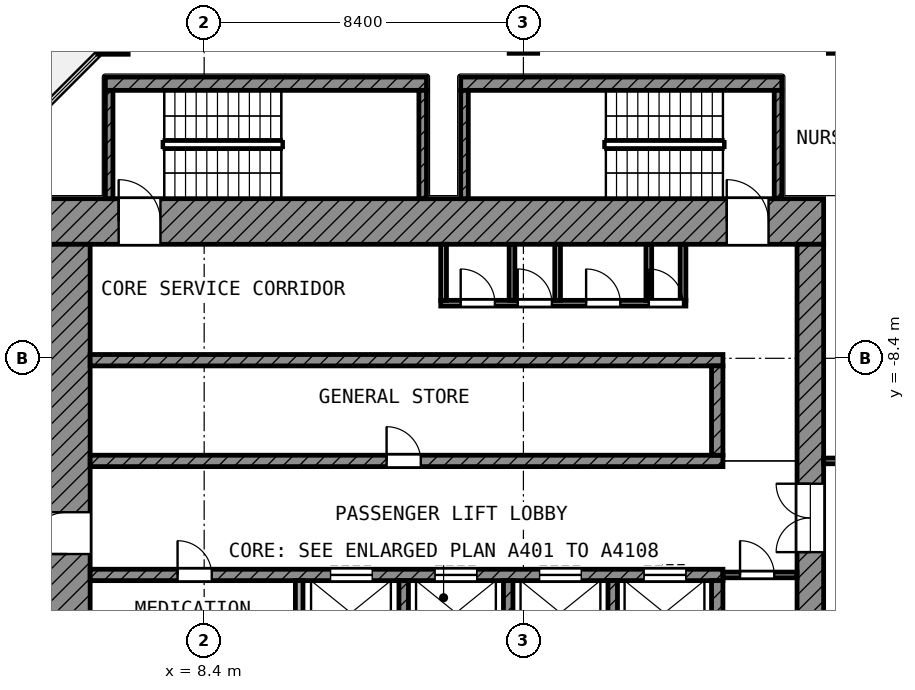
"""IFC4 building model, lengths in metres.
Left out: names, types, materials, properties, quantities, classifications, styles, units other than length and angle.
Written with IfcOpenShell. Run it as: python <this file> out.ifc"""

import sys

from ifc_helpers import new_model, si_unit, direction, frame, frame_2d, origin, origin_2d, place, context, subcontext, project, spatial, rectangle, extrude, element, fill, save


model = new_model("IFC4")
c1 = context("Model", 3, precision=1e-05, world=origin(), true_north=direction((0.0, 1.0)))
c2 = subcontext(c1, "Body", "Model", "MODEL_VIEW")
j1 = project(units=[si_unit("LENGTHUNIT", "METRE"), si_unit("PLANEANGLEUNIT", "RADIAN")], contexts=[c1])
p1 = place(None, origin())
s1 = spatial("IfcSite", under=j1, at=p1, CompositionType="ELEMENT")
p2 = place(p1, origin())
s2 = spatial("IfcBuilding", under=s1, at=p2, CompositionType="ELEMENT")
p3 = place(p2, frame((0.0, 0.0, 298.6)))
s3 = spatial("IfcBuildingStorey", under=s2, at=p3, CompositionType="ELEMENT", Elevation=298.6)
p4 = place(p3, frame((6.0, 0.0, 0.0), z_axis=(0.0, 0.0, 1.0), x_axis=(1.0, 0.0, 0.0)))
e1 = element("IfcColumn", 1, at=p4, inside=s3, PredefinedType="COLUMN", context=c2, shape_type="SweptSolid", body=[
    extrude(rectangle(XDim=0.8, YDim=0.8, at=origin_2d()), origin(), (0.0, 0.0, 1.0), 4.2),
])
for number, where, z_axis, x_axis in (
    (2, (16.8, 0.0, 0.0), (0.0, 0.0, 1.0), (1.0, 0.0, 0.0)),
    (3, (25.2, 0.0, 0.0), (0.0, 0.0, 1.0), (1.0, 0.0, 0.0)),
):
    element("IfcColumn", number, at=place(p3, frame(where, z_axis=z_axis, x_axis=x_axis)), inside=s3, PredefinedType="COLUMN", context=c2, shape_type="SweptSolid", body=[
        extrude(rectangle(XDim=0.75, YDim=0.75, at=origin_2d()), origin(), (0.0, 0.0, 1.0), 4.2),
    ])
p5 = place(p3, frame((4.2, -4.8, 0.0), z_axis=(0.0, 0.0, 1.0), x_axis=(1.0, 0.0, 0.0)))
e4 = element("IfcWall", 4, at=p5, inside=s3, PredefinedType="SHEAR", context=c2, shape_type="SweptSolid", body=[
    extrude(rectangle(XDim=20.5, YDim=1.2, at=frame_2d((10.25, 0.0))), origin(), (0.0, 0.0, 1.0), 3.6),
])
p6 = place(p5, frame((1.95, 0.0, 0.0)))
e5 = element("IfcOpeningElement", 5, at=p6, cuts=e4, PredefinedType="OPENING", context=c2, shape_type="SweptSolid", body=[
    extrude(rectangle(XDim=1.1, YDim=2.1, at=frame_2d((0.55, 1.05))), frame((0.0, 0.61, 0.0), z_axis=(0.0, -1.0, 0.0), x_axis=(1.0, 0.0, 0.0)), (0.0, 0.0, 1.0), 1.22),
])
p7 = place(p5, frame((17.95, 0.0, 0.0)))
e6 = element("IfcOpeningElement", 6, at=p7, cuts=e4, PredefinedType="OPENING", context=c2, shape_type="SweptSolid", body=[
    extrude(rectangle(XDim=1.1, YDim=2.1, at=frame_2d((0.55, 1.05))), frame((0.0, 0.61, 0.0), z_axis=(0.0, -1.0, 0.0), x_axis=(1.0, 0.0, 0.0)), (0.0, 0.0, 1.0), 1.22),
])
p8 = place(p3, frame((4.8, -24.7, 0.0), z_axis=(0.0, 0.0, 1.0), x_axis=(0.0, 1.0, 0.0)))
e7 = element("IfcWall", 7, at=p8, inside=s3, PredefinedType="SHEAR", context=c2, shape_type="SweptSolid", body=[
    extrude(rectangle(XDim=19.3, YDim=1.2, at=frame_2d((9.65, 0.0))), origin(), (0.0, 0.0, 1.0), 3.6),
])
p9 = place(p8, frame((11.15, 0.0, 0.0)))
e8 = element("IfcOpeningElement", 8, at=p9, cuts=e7, PredefinedType="OPENING", context=c2, shape_type="SweptSolid", body=[
    extrude(rectangle(XDim=1.1, YDim=2.1, at=frame_2d((0.55, 1.05))), frame((0.0, 0.61, 0.0), z_axis=(0.0, -1.0, 0.0), x_axis=(1.0, 0.0, 0.0)), (0.0, 0.0, 1.0), 1.22),
])
p10 = place(p8, frame((1.85, 0.0, 0.0)))
e9 = element("IfcOpeningElement", 9, at=p10, cuts=e7, PredefinedType="OPENING", context=c2, shape_type="SweptSolid", body=[
    extrude(rectangle(XDim=1.1, YDim=2.1, at=frame_2d((0.55, 1.05))), frame((0.0, 0.61, 0.0), z_axis=(0.0, -1.0, 0.0), x_axis=(1.0, 0.0, 0.0)), (0.0, 0.0, 1.0), 1.22),
])
p11 = place(p3, frame((24.35, -24.0, 0.0), z_axis=(0.0, 0.0, 1.0), x_axis=(0.0, 1.0, 0.0)))
e10 = element("IfcWall", 10, at=p11, inside=s3, PredefinedType="SHEAR", context=c2, shape_type="SweptSolid", body=[
    extrude(rectangle(XDim=18.6, YDim=0.7, at=frame_2d((9.3, 0.0))), origin(), (0.0, 0.0, 1.0), 3.6),
])
p12 = place(p11, frame((10.5, 0.0, 0.0)))
e11 = element("IfcOpeningElement", 11, at=p12, cuts=e10, PredefinedType="OPENING", context=c2, shape_type="SweptSolid", body=[
    extrude(rectangle(XDim=1.8, YDim=2.1, at=frame_2d((0.9, 1.05))), frame((0.0, 0.36, 0.0), z_axis=(0.0, -1.0, 0.0), x_axis=(1.0, 0.0, 0.0)), (0.0, 0.0, 1.0), 0.72),
])
p13 = place(p3, frame((5.4, -8.45, 0.0), z_axis=(0.0, 0.0, 1.0), x_axis=(1.0, 0.0, 0.0)))
e12 = element("IfcWall", 12, at=p13, inside=s3, PredefinedType="SHEAR", context=c2, shape_type="SweptSolid", body=[
    extrude(rectangle(XDim=16.65, YDim=0.3, at=frame_2d((8.325, 0.0))), origin(), (0.0, 0.0, 1.0), 3.6),
])
p14 = place(p3, frame((5.4, -11.1, 0.0), z_axis=(0.0, 0.0, 1.0), x_axis=(1.0, 0.0, 0.0)))
e13 = element("IfcWall", 13, at=p14, inside=s3, PredefinedType="SHEAR", context=c2, shape_type="SweptSolid", body=[
    extrude(rectangle(XDim=16.65, YDim=0.3, at=frame_2d((8.325, 0.0))), origin(), (0.0, 0.0, 1.0), 3.6),
])
p15 = place(p14, frame((7.8, 0.0, 0.0)))
e14 = element("IfcOpeningElement", 14, at=p15, cuts=e13, PredefinedType="OPENING", context=c2, shape_type="SweptSolid", body=[
    extrude(rectangle(XDim=0.9, YDim=2.1, at=frame_2d((0.45, 1.05))), frame((0.0, 0.16, 0.0), z_axis=(0.0, -1.0, 0.0), x_axis=(1.0, 0.0, 0.0)), (0.0, 0.0, 1.0), 0.32),
])
p16 = place(p3, frame((5.4, -14.1, 0.0), z_axis=(0.0, 0.0, 1.0), x_axis=(1.0, 0.0, 0.0)))
e15 = element("IfcWall", 15, at=p16, inside=s3, PredefinedType="SHEAR", context=c2, shape_type="SweptSolid", body=[
    extrude(rectangle(XDim=16.65, YDim=0.3, at=frame_2d((8.325, 0.0))), origin(), (0.0, 0.0, 1.0), 3.6),
])
p17 = place(p16, frame((6.325, 0.0, 0.0)))
e16 = element("IfcOpeningElement", 16, at=p17, cuts=e15, PredefinedType="OPENING", context=c2, shape_type="SweptSolid", body=[
    extrude(rectangle(XDim=1.1, YDim=2.1, at=frame_2d((0.55, 1.05))), frame((0.0, 0.16, 0.0), z_axis=(0.0, -1.0, 0.0), x_axis=(1.0, 0.0, 0.0)), (0.0, 0.0, 1.0), 0.32),
])
p18 = place(p16, frame((9.075, 0.0, 0.0)))
e17 = element("IfcOpeningElement", 17, at=p18, cuts=e15, PredefinedType="OPENING", context=c2, shape_type="SweptSolid", body=[
    extrude(rectangle(XDim=1.1, YDim=2.1, at=frame_2d((0.55, 1.05))), frame((0.0, 0.16, 0.0), z_axis=(0.0, -1.0, 0.0), x_axis=(1.0, 0.0, 0.0)), (0.0, 0.0, 1.0), 0.32),
])
p19 = place(p16, frame((11.825, 0.0, 0.0)))
e18 = element("IfcOpeningElement", 18, at=p19, cuts=e15, PredefinedType="OPENING", context=c2, shape_type="SweptSolid", body=[
    extrude(rectangle(XDim=1.1, YDim=2.1, at=frame_2d((0.55, 1.05))), frame((0.0, 0.16, 0.0), z_axis=(0.0, -1.0, 0.0), x_axis=(1.0, 0.0, 0.0)), (0.0, 0.0, 1.0), 0.32),
])
p20 = place(p16, frame((14.575, 0.0, 0.0)))
e19 = element("IfcOpeningElement", 19, at=p20, cuts=e15, PredefinedType="OPENING", context=c2, shape_type="SweptSolid", body=[
    extrude(rectangle(XDim=1.1, YDim=2.1, at=frame_2d((0.55, 1.05))), frame((0.0, 0.16, 0.0), z_axis=(0.0, -1.0, 0.0), x_axis=(1.0, 0.0, 0.0)), (0.0, 0.0, 1.0), 0.32),
])
p21 = place(p16, frame((2.3, 0.0, 0.0)))
e20 = element("IfcOpeningElement", 20, at=p21, cuts=e15, PredefinedType="OPENING", context=c2, shape_type="SweptSolid", body=[
    extrude(rectangle(XDim=0.9, YDim=2.1, at=frame_2d((0.45, 1.05))), frame((0.0, 0.16, 0.0), z_axis=(0.0, -1.0, 0.0), x_axis=(1.0, 0.0, 0.0)), (0.0, 0.0, 1.0), 0.32),
])
p22 = place(p3, frame((21.9, -10.95, 0.0), z_axis=(0.0, 0.0, 1.0), x_axis=(0.0, 1.0, 0.0)))
e21 = element("IfcWall", 21, at=p22, inside=s3, PredefinedType="SHEAR", context=c2, shape_type="SweptSolid", body=[
    extrude(rectangle(XDim=2.35, YDim=0.3, at=frame_2d((1.175, 0.0))), origin(), (0.0, 0.0, 1.0), 3.6),
])
p23 = place(p3, frame((21.9, -16.6, 0.0), z_axis=(0.0, 0.0, 1.0), x_axis=(0.0, 1.0, 0.0)))
e22 = element("IfcWall", 22, at=p23, inside=s3, PredefinedType="SHEAR", context=c2, shape_type="SweptSolid", body=[
    extrude(rectangle(XDim=2.35, YDim=0.3, at=frame_2d((1.175, 0.0))), origin(), (0.0, 0.0, 1.0), 3.6),
])
p24 = place(p3, frame((10.9, -16.6, 0.0), z_axis=(0.0, 0.0, 1.0), x_axis=(0.0, 1.0, 0.0)))
e23 = element("IfcWall", 23, at=p24, inside=s3, PredefinedType="PARTITIONING", context=c2, shape_type="SweptSolid", body=[
    extrude(rectangle(XDim=2.35, YDim=0.2, at=frame_2d((1.175, 0.0))), origin(), (0.0, 0.0, 1.0), 3.6),
])
for number, where, z_axis, x_axis in (
    (24, (13.65, -16.6, 0.0), (0.0, 0.0, 1.0), (0.0, 1.0, 0.0)),
    (25, (16.4, -16.6, 0.0), (0.0, 0.0, 1.0), (0.0, 1.0, 0.0)),
    (26, (19.15, -16.6, 0.0), (0.0, 0.0, 1.0), (0.0, 1.0, 0.0)),
):
    element("IfcWall", number, at=place(p3, frame(where, z_axis=z_axis, x_axis=x_axis)), inside=s3, PredefinedType="SHEAR", context=c2, shape_type="SweptSolid", body=[
        extrude(rectangle(XDim=2.35, YDim=0.25, at=frame_2d((1.175, 0.0))), origin(), (0.0, 0.0, 1.0), 3.6),
    ])
p25 = place(p3, frame((22.05, -14.1, 0.0), z_axis=(0.0, 0.0, 1.0), x_axis=(1.0, 0.0, 0.0)))
e27 = element("IfcWall", 27, at=p25, inside=s3, PredefinedType="PARTITIONING", context=c2, shape_type="SweptSolid", body=[
    extrude(rectangle(XDim=1.95, YDim=0.15, at=frame_2d((0.975, 0.0))), origin(), (0.0, 0.0, 1.0), 3.6),
])
p26 = place(p25, frame((0.45, 0.0, 0.0)))
e28 = element("IfcOpeningElement", 28, at=p26, cuts=e27, PredefinedType="OPENING", context=c2, shape_type="SweptSolid", body=[
    extrude(rectangle(XDim=0.9, YDim=2.1, at=frame_2d((0.45, 1.05))), frame((0.0, 0.085, 0.0), z_axis=(0.0, -1.0, 0.0), x_axis=(1.0, 0.0, 0.0)), (0.0, 0.0, 1.0), 0.17),
])
p27 = place(p3, frame((14.625, -6.95, 0.0), z_axis=(0.0, 0.0, 1.0), x_axis=(1.0, 0.0, 0.0)))
e29 = element("IfcWall", 29, at=p27, inside=s3, PredefinedType="PARTITIONING", context=c2, shape_type="SweptSolid", body=[
    extrude(rectangle(XDim=6.45, YDim=0.15, at=frame_2d((3.225, 0.0))), origin(), (0.0, 0.0, 1.0), 3.6),
])
p28 = place(p27, frame((0.525, 0.0, 0.0)))
e30 = element("IfcOpeningElement", 30, at=p28, cuts=e29, PredefinedType="OPENING", context=c2, shape_type="SweptSolid", body=[
    extrude(rectangle(XDim=0.9, YDim=2.1, at=frame_2d((0.45, 1.05))), frame((0.0, 0.085, 0.0), z_axis=(0.0, -1.0, 0.0), x_axis=(1.0, 0.0, 0.0)), (0.0, 0.0, 1.0), 0.17),
])
p29 = place(p27, frame((2.025, 0.0, 0.0)))
e31 = element("IfcOpeningElement", 31, at=p29, cuts=e29, PredefinedType="OPENING", context=c2, shape_type="SweptSolid", body=[
    extrude(rectangle(XDim=0.9, YDim=2.1, at=frame_2d((0.45, 1.05))), frame((0.0, 0.085, 0.0), z_axis=(0.0, -1.0, 0.0), x_axis=(1.0, 0.0, 0.0)), (0.0, 0.0, 1.0), 0.17),
])
p30 = place(p27, frame((3.825, 0.0, 0.0)))
e32 = element("IfcOpeningElement", 32, at=p30, cuts=e29, PredefinedType="OPENING", context=c2, shape_type="SweptSolid", body=[
    extrude(rectangle(XDim=0.9, YDim=2.1, at=frame_2d((0.45, 1.05))), frame((0.0, 0.085, 0.0), z_axis=(0.0, -1.0, 0.0), x_axis=(1.0, 0.0, 0.0)), (0.0, 0.0, 1.0), 0.17),
])
p31 = place(p27, frame((5.475, 0.0, 0.0)))
e33 = element("IfcOpeningElement", 33, at=p31, cuts=e29, PredefinedType="OPENING", context=c2, shape_type="SweptSolid", body=[
    extrude(rectangle(XDim=0.9, YDim=2.1, at=frame_2d((0.45, 1.05))), frame((0.0, 0.085, 0.0), z_axis=(0.0, -1.0, 0.0), x_axis=(1.0, 0.0, 0.0)), (0.0, 0.0, 1.0), 0.17),
])
for number, where, z_axis, x_axis in (
    (34, (14.7, -6.875, 0.0), (0.0, 0.0, 1.0), (0.0, 1.0, 0.0)),
    (35, (16.5, -6.875, 0.0), (0.0, 0.0, 1.0), (0.0, 1.0, 0.0)),
    (36, (17.7, -6.875, 0.0), (0.0, 0.0, 1.0), (0.0, 1.0, 0.0)),
    (37, (20.1, -6.875, 0.0), (0.0, 0.0, 1.0), (0.0, 1.0, 0.0)),
    (38, (21.0, -6.875, 0.0), (0.0, 0.0, 1.0), (0.0, 1.0, 0.0)),
):
    element("IfcWall", number, at=place(p3, frame(where, z_axis=z_axis, x_axis=x_axis)), inside=s3, PredefinedType="PARTITIONING", context=c2, shape_type="SweptSolid", body=[
        extrude(rectangle(XDim=1.475, YDim=0.15, at=frame_2d((0.738, 0.0))), origin(), (0.0, 0.0, 1.0), 3.6),
    ])
p32 = place(p3, frame((5.8, -1.175, 0.0), z_axis=(0.0, 0.0, 1.0), x_axis=(1.0, 0.0, 0.0)))
e39 = element("IfcWall", 39, at=p32, inside=s3, PredefinedType="SHEAR", context=c2, shape_type="SweptSolid", body=[
    extrude(rectangle(XDim=8.45, YDim=0.35, at=frame_2d((4.225, 0.0))), origin(), (0.0, 0.0, 1.0), 3.6),
])
for number, where, z_axis, x_axis in (
    (40, (5.9, -4.2, 0.0), (0.0, 0.0, 1.0), (0.0, 1.0, 0.0)),
    (41, (14.15, -4.2, 0.0), (0.0, 0.0, 1.0), (0.0, 1.0, 0.0)),
):
    element("IfcWall", number, at=place(p3, frame(where, z_axis=z_axis, x_axis=x_axis)), inside=s3, PredefinedType="SHEAR", context=c2, shape_type="SweptSolid", body=[
        extrude(rectangle(XDim=2.85, YDim=0.2, at=frame_2d((1.425, 0.0))), origin(), (0.0, 0.0, 1.0), 3.6),
    ])
p33 = place(p3, frame((15.15, -1.175, 0.0), z_axis=(0.0, 0.0, 1.0), x_axis=(1.0, 0.0, 0.0)))
e42 = element("IfcWall", 42, at=p33, inside=s3, PredefinedType="SHEAR", context=c2, shape_type="SweptSolid", body=[
    extrude(rectangle(XDim=8.45, YDim=0.35, at=frame_2d((4.225, 0.0))), origin(), (0.0, 0.0, 1.0), 3.6),
])
for number, where, z_axis, x_axis in (
    (43, (15.25, -4.2, 0.0), (0.0, 0.0, 1.0), (0.0, 1.0, 0.0)),
    (44, (23.5, -4.2, 0.0), (0.0, 0.0, 1.0), (0.0, 1.0, 0.0)),
):
    element("IfcWall", number, at=place(p3, frame(where, z_axis=z_axis, x_axis=x_axis)), inside=s3, PredefinedType="SHEAR", context=c2, shape_type="SweptSolid", body=[
        extrude(rectangle(XDim=2.85, YDim=0.2, at=frame_2d((1.425, 0.0))), origin(), (0.0, 0.0, 1.0), 3.6),
    ])
p34 = place(p3, frame((24.7, -11.1, 0.0), z_axis=(0.0, 0.0, 1.0), x_axis=(1.0, 0.0, 0.0)))
e45 = element("IfcWall", 45, at=p34, inside=s3, PredefinedType="PARTITIONING", context=c2, shape_type="SweptSolid", body=[
    extrude(rectangle(XDim=4.625, YDim=0.15, at=frame_2d((2.312, 0.0))), origin(), (0.0, 0.0, 1.0), 3.6),
])
p35 = place(p34, frame((2.0, 0.0, 0.0)))
e46 = element("IfcOpeningElement", 46, at=p35, cuts=e45, PredefinedType="OPENING", context=c2, shape_type="SweptSolid", body=[
    extrude(rectangle(XDim=1.2, YDim=2.1, at=frame_2d((0.6, 1.05))), frame((0.0, 0.085, 0.0), z_axis=(0.0, -1.0, 0.0), x_axis=(1.0, 0.0, 0.0)), (0.0, 0.0, 1.0), 0.17),
])
p36 = place(p17, origin())
e47 = element("IfcDoor", 47, at=p36, inside=s3, OperationType="DOUBLE_DOOR_SLIDING", PredefinedType="DOOR", context=c2, shape_type="SweptSolid", body=[
    extrude(rectangle(XDim=1.1, YDim=2.1, at=frame_2d((0.55, 1.05))), frame((0.0, 0.025, 0.0), z_axis=(0.0, -1.0, 0.0), x_axis=(1.0, 0.0, 0.0)), (0.0, 0.0, 1.0), 0.05),
])
fill(e16, e47)
p37 = place(p18, origin())
e48 = element("IfcDoor", 48, at=p37, inside=s3, OperationType="DOUBLE_DOOR_SLIDING", PredefinedType="DOOR", context=c2, shape_type="SweptSolid", body=[
    extrude(rectangle(XDim=1.1, YDim=2.1, at=frame_2d((0.55, 1.05))), frame((0.0, 0.025, 0.0), z_axis=(0.0, -1.0, 0.0), x_axis=(1.0, 0.0, 0.0)), (0.0, 0.0, 1.0), 0.05),
])
fill(e17, e48)
p38 = place(p19, origin())
e49 = element("IfcDoor", 49, at=p38, inside=s3, OperationType="DOUBLE_DOOR_SLIDING", PredefinedType="DOOR", context=c2, shape_type="SweptSolid", body=[
    extrude(rectangle(XDim=1.1, YDim=2.1, at=frame_2d((0.55, 1.05))), frame((0.0, 0.025, 0.0), z_axis=(0.0, -1.0, 0.0), x_axis=(1.0, 0.0, 0.0)), (0.0, 0.0, 1.0), 0.05),
])
fill(e18, e49)
p39 = place(p20, origin())
e50 = element("IfcDoor", 50, at=p39, inside=s3, OperationType="DOUBLE_DOOR_SLIDING", PredefinedType="DOOR", context=c2, shape_type="SweptSolid", body=[
    extrude(rectangle(XDim=1.1, YDim=2.1, at=frame_2d((0.55, 1.05))), frame((0.0, 0.025, 0.0), z_axis=(0.0, -1.0, 0.0), x_axis=(1.0, 0.0, 0.0)), (0.0, 0.0, 1.0), 0.05),
])
fill(e19, e50)
p40 = place(p9, origin())
e51 = element("IfcDoor", 51, at=p40, inside=s3, OperationType="SINGLE_SWING_LEFT", PredefinedType="DOOR", context=c2, shape_type="SweptSolid", body=[
    extrude(rectangle(XDim=1.1, YDim=2.1, at=frame_2d((0.55, 1.05))), frame((0.0, 0.025, 0.0), z_axis=(0.0, -1.0, 0.0), x_axis=(1.0, 0.0, 0.0)), (0.0, 0.0, 1.0), 0.05),
])
fill(e8, e51)
p41 = place(p6, origin())
e52 = element("IfcDoor", 52, at=p41, inside=s3, OperationType="SINGLE_SWING_LEFT", PredefinedType="DOOR", context=c2, shape_type="SweptSolid", body=[
    extrude(rectangle(XDim=1.1, YDim=2.1, at=frame_2d((0.55, 1.05))), frame((0.0, 0.025, 0.0), z_axis=(0.0, -1.0, 0.0), x_axis=(1.0, 0.0, 0.0)), (0.0, 0.0, 1.0), 0.05),
])
fill(e5, e52)
p42 = place(p7, origin())
e53 = element("IfcDoor", 53, at=p42, inside=s3, OperationType="SINGLE_SWING_LEFT", PredefinedType="DOOR", context=c2, shape_type="SweptSolid", body=[
    extrude(rectangle(XDim=1.1, YDim=2.1, at=frame_2d((0.55, 1.05))), frame((0.0, 0.025, 0.0), z_axis=(0.0, -1.0, 0.0), x_axis=(1.0, 0.0, 0.0)), (0.0, 0.0, 1.0), 0.05),
])
fill(e6, e53)
p43 = place(p12, origin())
e54 = element("IfcDoor", 54, at=p43, inside=s3, OperationType="DOUBLE_DOOR_SINGLE_SWING", PredefinedType="DOOR", context=c2, shape_type="SweptSolid", body=[
    extrude(rectangle(XDim=1.8, YDim=2.1, at=frame_2d((0.9, 1.05))), frame((0.0, 0.025, 0.0), z_axis=(0.0, -1.0, 0.0), x_axis=(1.0, 0.0, 0.0)), (0.0, 0.0, 1.0), 0.05),
])
fill(e11, e54)
p44 = place(p28, origin())
e55 = element("IfcDoor", 55, at=p44, inside=s3, OperationType="SINGLE_SWING_LEFT", PredefinedType="DOOR", context=c2, shape_type="SweptSolid", body=[
    extrude(rectangle(XDim=0.9, YDim=2.1, at=frame_2d((0.45, 1.05))), frame((0.0, 0.025, 0.0), z_axis=(0.0, -1.0, 0.0), x_axis=(1.0, 0.0, 0.0)), (0.0, 0.0, 1.0), 0.05),
])
fill(e30, e55)
p45 = place(p29, origin())
e56 = element("IfcDoor", 56, at=p45, inside=s3, OperationType="SINGLE_SWING_LEFT", PredefinedType="DOOR", context=c2, shape_type="SweptSolid", body=[
    extrude(rectangle(XDim=0.9, YDim=2.1, at=frame_2d((0.45, 1.05))), frame((0.0, 0.025, 0.0), z_axis=(0.0, -1.0, 0.0), x_axis=(1.0, 0.0, 0.0)), (0.0, 0.0, 1.0), 0.05),
])
fill(e31, e56)
p46 = place(p30, origin())
e57 = element("IfcDoor", 57, at=p46, inside=s3, OperationType="SINGLE_SWING_LEFT", PredefinedType="DOOR", context=c2, shape_type="SweptSolid", body=[
    extrude(rectangle(XDim=0.9, YDim=2.1, at=frame_2d((0.45, 1.05))), frame((0.0, 0.025, 0.0), z_axis=(0.0, -1.0, 0.0), x_axis=(1.0, 0.0, 0.0)), (0.0, 0.0, 1.0), 0.05),
])
fill(e32, e57)
p47 = place(p31, origin())
e58 = element("IfcDoor", 58, at=p47, inside=s3, OperationType="SINGLE_SWING_LEFT", PredefinedType="DOOR", context=c2, shape_type="SweptSolid", body=[
    extrude(rectangle(XDim=0.9, YDim=2.1, at=frame_2d((0.45, 1.05))), frame((0.0, 0.025, 0.0), z_axis=(0.0, -1.0, 0.0), x_axis=(1.0, 0.0, 0.0)), (0.0, 0.0, 1.0), 0.05),
])
fill(e33, e58)
p48 = place(p26, origin())
e59 = element("IfcDoor", 59, at=p48, inside=s3, OperationType="SINGLE_SWING_LEFT", PredefinedType="DOOR", context=c2, shape_type="SweptSolid", body=[
    extrude(rectangle(XDim=0.9, YDim=2.1, at=frame_2d((0.45, 1.05))), frame((0.0, 0.025, 0.0), z_axis=(0.0, -1.0, 0.0), x_axis=(1.0, 0.0, 0.0)), (0.0, 0.0, 1.0), 0.05),
])
fill(e28, e59)
p49 = place(p15, origin())
e60 = element("IfcDoor", 60, at=p49, inside=s3, OperationType="SINGLE_SWING_LEFT", PredefinedType="DOOR", context=c2, shape_type="SweptSolid", body=[
    extrude(rectangle(XDim=0.9, YDim=2.1, at=frame_2d((0.45, 1.05))), frame((0.0, 0.025, 0.0), z_axis=(0.0, -1.0, 0.0), x_axis=(1.0, 0.0, 0.0)), (0.0, 0.0, 1.0), 0.05),
])
fill(e14, e60)
p50 = place(p21, origin())
e61 = element("IfcDoor", 61, at=p50, inside=s3, OperationType="SINGLE_SWING_LEFT", PredefinedType="DOOR", context=c2, shape_type="SweptSolid", body=[
    extrude(rectangle(XDim=0.9, YDim=2.1, at=frame_2d((0.45, 1.05))), frame((0.0, 0.025, 0.0), z_axis=(0.0, -1.0, 0.0), x_axis=(1.0, 0.0, 0.0)), (0.0, 0.0, 1.0), 0.05),
])
fill(e20, e61)
save(model, sys.argv[1])
